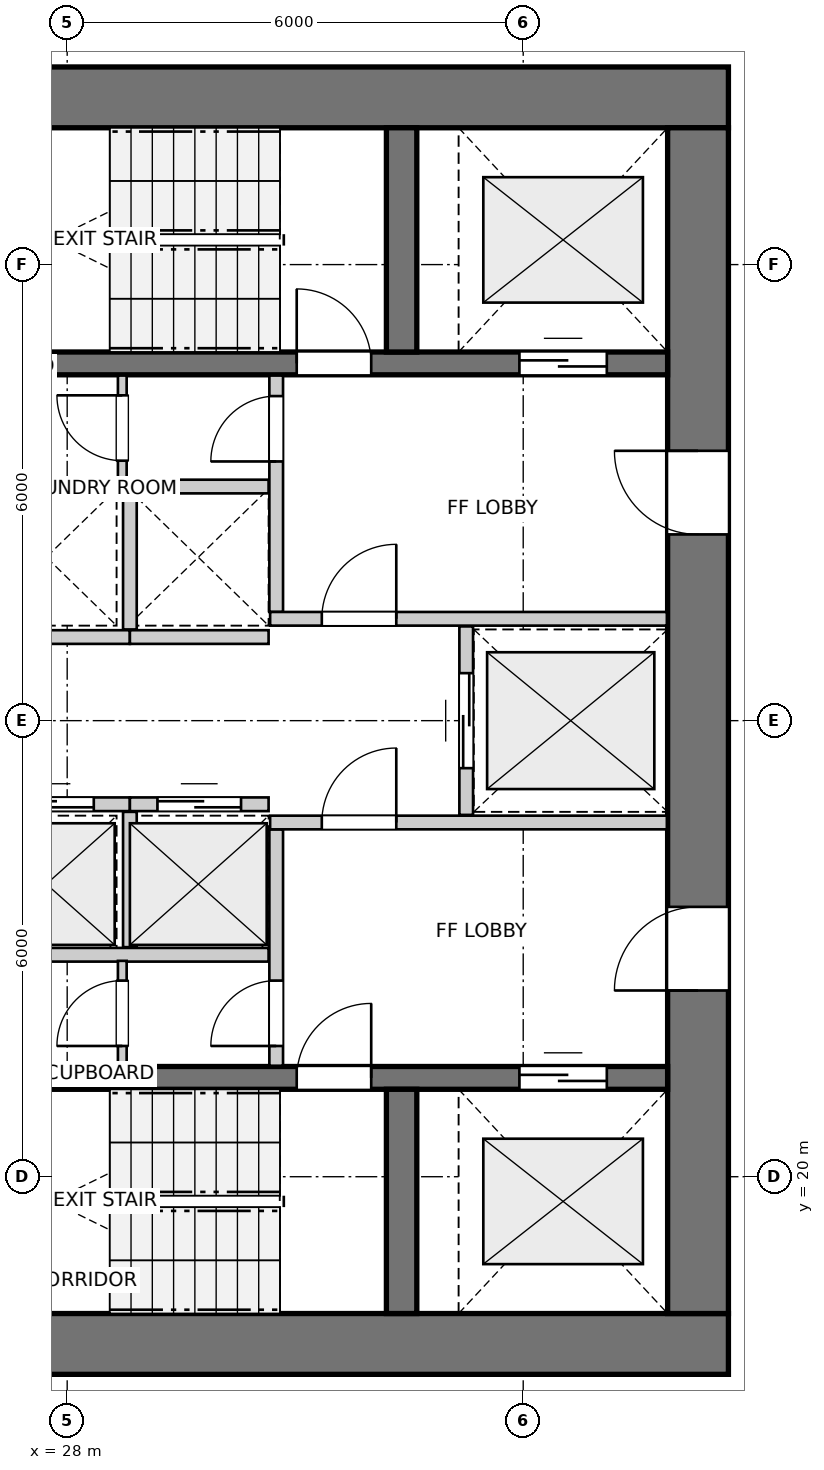
"""IFC4 building model, lengths in metres.
Left out: names, types, materials, properties, quantities, classifications, styles, units other than length and angle.
Written with IfcOpenShell. Run it as: python <this file> out.ifc"""

import sys

from ifc_helpers import new_model, si_unit, direction, frame, frame_2d, origin, place, context, subcontext, project, spatial, rectangle, extrude, source, transform, mapped, element, fill, save


model = new_model("IFC4")
c1 = context("Model", 3, precision=1e-05, world=origin(), true_north=direction((0.0, 1.0)))
c2 = subcontext(c1, "Body", "Model", "MODEL_VIEW")
j1 = project(units=[si_unit("LENGTHUNIT", "METRE"), si_unit("PLANEANGLEUNIT", "RADIAN")], contexts=[c1])
p1 = place(None, origin())
s1 = spatial("IfcSite", under=j1, at=p1, CompositionType="ELEMENT")
p2 = place(p1, origin())
s2 = spatial("IfcBuilding", under=s1, at=p2, CompositionType="ELEMENT")
p3 = place(p2, frame((0.0, 0.0, 55.8)))
s3 = spatial("IfcBuildingStorey", under=s2, at=p3, CompositionType="ELEMENT", Elevation=55.8)
for number, where, z_axis, x_axis in (
    (1, (24.0, 17.8, 0.0), (0.0, 0.0, 1.0), (1.0, 0.0, 0.0)),
    (2, (36.7, 34.2, 0.0), (0.0, 0.0, 1.0), (-1.0, 0.0, 0.0)),
):
    element("IfcWall", number, at=place(p3, frame(where, z_axis=z_axis, x_axis=x_axis)), inside=s3, PredefinedType="SHEAR", context=c2, shape_type="SweptSolid", body=[
        extrude(rectangle(XDim=12.7, YDim=0.8, at=frame_2d((6.35, 0.0))), origin(), (0.0, 0.0, 1.0), 2.94),
    ])
p4 = place(p3, frame((36.3, 18.2, 0.0), z_axis=(0.0, 0.0, 1.0), x_axis=(0.0, 1.0, 0.0)))
e3 = element("IfcWall", 3, at=p4, inside=s3, PredefinedType="SHEAR", context=c2, shape_type="SweptSolid", body=[
    extrude(rectangle(XDim=15.6, YDim=0.8, at=frame_2d((7.8, 0.0))), origin(), (0.0, 0.0, 1.0), 2.94),
])
p5 = place(p4, frame((4.25, 0.0, 0.0)))
e4 = element("IfcOpeningElement", 4, at=p5, cuts=e3, PredefinedType="OPENING", context=c2, shape_type="SweptSolid", body=[
    extrude(rectangle(XDim=1.1, YDim=2.15, at=frame_2d((0.55, 1.075))), frame((0.0, 0.41, 0.0), z_axis=(0.0, -1.0, 0.0), x_axis=(1.0, 0.0, 0.0)), (0.0, 0.0, 1.0), 0.82),
])
p6 = place(p4, frame((10.25, 0.0, 0.0)))
e5 = element("IfcOpeningElement", 5, at=p6, cuts=e3, PredefinedType="OPENING", context=c2, shape_type="SweptSolid", body=[
    extrude(rectangle(XDim=1.1, YDim=2.15, at=frame_2d((0.55, 1.075))), frame((0.0, 0.41, 0.0), z_axis=(0.0, -1.0, 0.0), x_axis=(1.0, 0.0, 0.0)), (0.0, 0.0, 1.0), 0.82),
])
p7 = place(p3, frame((24.8, 21.3, 0.0), z_axis=(0.0, 0.0, 1.0), x_axis=(1.0, 0.0, 0.0)))
e6 = element("IfcWall", 6, at=p7, inside=s3, PredefinedType="SHEAR", context=c2, shape_type="SweptSolid", body=[
    extrude(rectangle(XDim=11.1, YDim=0.3, at=frame_2d((5.55, 0.0))), origin(), (0.0, 0.0, 1.0), 2.94),
])
p8 = place(p7, frame((6.22, 0.0, 0.0)))
e7 = element("IfcOpeningElement", 7, at=p8, cuts=e6, PredefinedType="OPENING", context=c2, shape_type="SweptSolid", body=[
    extrude(rectangle(XDim=0.98, YDim=2.15, at=frame_2d((0.49, 1.075))), frame((0.0, 0.16, 0.0), z_axis=(0.0, -1.0, 0.0), x_axis=(1.0, 0.0, 0.0)), (0.0, 0.0, 1.0), 0.32),
])
p9 = place(p7, frame((9.15, 0.0, 0.0)))
e8 = element("IfcOpeningElement", 8, at=p9, cuts=e6, PredefinedType="OPENING", context=c2, shape_type="SweptSolid", body=[
    extrude(rectangle(XDim=1.15, YDim=2.15, at=frame_2d((0.575, 1.075))), frame((0.0, 0.16, 0.0), z_axis=(0.0, -1.0, 0.0), x_axis=(1.0, 0.0, 0.0)), (0.0, 0.0, 1.0), 0.32),
])
p10 = place(p3, frame((32.4, 18.2, 0.0), z_axis=(0.0, 0.0, 1.0), x_axis=(0.0, 1.0, 0.0)))
e9 = element("IfcWall", 9, at=p10, inside=s3, PredefinedType="SHEAR", context=c2, shape_type="SweptSolid", body=[
    extrude(rectangle(XDim=2.95, YDim=0.4, at=frame_2d((1.475, 0.0))), origin(), (0.0, 0.0, 1.0), 2.94),
])
p11 = place(p3, frame((24.8, 30.7, 0.0), z_axis=(0.0, 0.0, 1.0), x_axis=(1.0, 0.0, 0.0)))
e10 = element("IfcWall", 10, at=p11, inside=s3, PredefinedType="SHEAR", context=c2, shape_type="SweptSolid", body=[
    extrude(rectangle(XDim=11.1, YDim=0.3, at=frame_2d((5.55, 0.0))), origin(), (0.0, 0.0, 1.0), 2.94),
])
p12 = place(p11, frame((6.22, 0.0, 0.0)))
e11 = element("IfcOpeningElement", 11, at=p12, cuts=e10, PredefinedType="OPENING", context=c2, shape_type="SweptSolid", body=[
    extrude(rectangle(XDim=0.98, YDim=2.15, at=frame_2d((0.49, 1.075))), frame((0.0, 0.16, 0.0), z_axis=(0.0, -1.0, 0.0), x_axis=(1.0, 0.0, 0.0)), (0.0, 0.0, 1.0), 0.32),
])
p13 = place(p11, frame((9.15, 0.0, 0.0)))
e12 = element("IfcOpeningElement", 12, at=p13, cuts=e10, PredefinedType="OPENING", context=c2, shape_type="SweptSolid", body=[
    extrude(rectangle(XDim=1.15, YDim=2.15, at=frame_2d((0.575, 1.075))), frame((0.0, 0.16, 0.0), z_axis=(0.0, -1.0, 0.0), x_axis=(1.0, 0.0, 0.0)), (0.0, 0.0, 1.0), 0.32),
])
p14 = place(p3, frame((32.4, 30.85, 0.0), z_axis=(0.0, 0.0, 1.0), x_axis=(0.0, 1.0, 0.0)))
e13 = element("IfcWall", 13, at=p14, inside=s3, PredefinedType="SHEAR", context=c2, shape_type="SweptSolid", body=[
    extrude(rectangle(XDim=2.95, YDim=0.4, at=frame_2d((1.475, 0.0))), origin(), (0.0, 0.0, 1.0), 2.94),
])
p15 = place(p3, frame((30.75, 21.46, 0.0), z_axis=(0.0, 0.0, 1.0), x_axis=(0.0, 1.0, 0.0)))
e14 = element("IfcWall", 14, at=p15, inside=s3, PredefinedType="PARTITIONING", context=c2, shape_type="SweptSolid", body=[
    extrude(rectangle(XDim=3.11, YDim=0.18, at=frame_2d((1.555, 0.0))), origin(), (0.0, 0.0, 1.0), 2.94),
])
p16 = place(p15, frame((0.26, 0.0, 0.0)))
e15 = element("IfcOpeningElement", 15, at=p16, cuts=e14, PredefinedType="OPENING", context=c2, shape_type="SweptSolid", body=[
    extrude(rectangle(XDim=0.86, YDim=2.05, at=frame_2d((0.43, 1.025))), frame((0.0, 0.1, 0.0), z_axis=(0.0, -1.0, 0.0), x_axis=(1.0, 0.0, 0.0)), (0.0, 0.0, 1.0), 0.2),
])
p17 = place(p3, frame((30.67, 24.66, 0.0), z_axis=(0.0, 0.0, 1.0), x_axis=(1.0, 0.0, 0.0)))
e16 = element("IfcWall", 16, at=p17, inside=s3, PredefinedType="PARTITIONING", context=c2, shape_type="SweptSolid", body=[
    extrude(rectangle(XDim=5.22, YDim=0.18, at=frame_2d((2.61, 0.0))), origin(), (0.0, 0.0, 1.0), 2.94),
])
p18 = place(p17, frame((0.68, 0.0, 0.0)))
e17 = element("IfcOpeningElement", 17, at=p18, cuts=e16, PredefinedType="OPENING", context=c2, shape_type="SweptSolid", body=[
    extrude(rectangle(XDim=0.98, YDim=2.15, at=frame_2d((0.49, 1.075))), frame((0.0, 0.1, 0.0), z_axis=(0.0, -1.0, 0.0), x_axis=(1.0, 0.0, 0.0)), (0.0, 0.0, 1.0), 0.2),
])
p19 = place(p3, frame((30.75, 27.43, 0.0), z_axis=(0.0, 0.0, 1.0), x_axis=(0.0, 1.0, 0.0)))
e18 = element("IfcWall", 18, at=p19, inside=s3, PredefinedType="PARTITIONING", context=c2, shape_type="SweptSolid", body=[
    extrude(rectangle(XDim=3.11, YDim=0.18, at=frame_2d((1.555, 0.0))), origin(), (0.0, 0.0, 1.0), 2.94),
])
p20 = place(p19, frame((1.98, 0.0, 0.0)))
e19 = element("IfcOpeningElement", 19, at=p20, cuts=e18, PredefinedType="OPENING", context=c2, shape_type="SweptSolid", body=[
    extrude(rectangle(XDim=0.86, YDim=2.05, at=frame_2d((0.43, 1.025))), frame((0.0, 0.1, 0.0), z_axis=(0.0, -1.0, 0.0), x_axis=(1.0, 0.0, 0.0)), (0.0, 0.0, 1.0), 0.2),
])
p21 = place(p3, frame((30.67, 27.34, 0.0), z_axis=(0.0, 0.0, 1.0), x_axis=(1.0, 0.0, 0.0)))
e20 = element("IfcWall", 20, at=p21, inside=s3, PredefinedType="PARTITIONING", context=c2, shape_type="SweptSolid", body=[
    extrude(rectangle(XDim=5.22, YDim=0.18, at=frame_2d((2.61, 0.0))), origin(), (0.0, 0.0, 1.0), 2.94),
])
p22 = place(p21, frame((0.68, 0.0, 0.0)))
e21 = element("IfcOpeningElement", 21, at=p22, cuts=e20, PredefinedType="OPENING", context=c2, shape_type="SweptSolid", body=[
    extrude(rectangle(XDim=0.98, YDim=2.15, at=frame_2d((0.49, 1.075))), frame((0.0, 0.1, 0.0), z_axis=(0.0, -1.0, 0.0), x_axis=(1.0, 0.0, 0.0)), (0.0, 0.0, 1.0), 0.2),
])
p23 = place(p3, frame((33.25, 24.76, 0.0), z_axis=(0.0, 0.0, 1.0), x_axis=(0.0, 1.0, 0.0)))
e22 = element("IfcWall", 22, at=p23, inside=s3, PredefinedType="PARTITIONING", context=c2, shape_type="SweptSolid", body=[
    extrude(rectangle(XDim=2.48, YDim=0.18, at=frame_2d((1.24, 0.0))), origin(), (0.0, 0.0, 1.0), 2.94),
])
p24 = place(p23, frame((0.615, 0.0, 0.0)))
e23 = element("IfcOpeningElement", 23, at=p24, cuts=e22, PredefinedType="OPENING", context=c2, shape_type="SweptSolid", body=[
    extrude(rectangle(XDim=1.25, YDim=2.15, at=frame_2d((0.625, 1.075))), frame((0.0, 0.1, 0.0), z_axis=(0.0, -1.0, 0.0), x_axis=(1.0, 0.0, 0.0)), (0.0, 0.0, 1.0), 0.2),
])
p25 = place(p3, frame((24.81, 22.92, 0.0), z_axis=(0.0, 0.0, 1.0), x_axis=(1.0, 0.0, 0.0)))
e24 = element("IfcWall", 24, at=p25, inside=s3, PredefinedType="PARTITIONING", context=c2, shape_type="SweptSolid", body=[
    extrude(rectangle(XDim=5.84, YDim=0.18, at=frame_2d((2.92, 0.0))), origin(), (0.0, 0.0, 1.0), 2.94),
])
p26 = place(p3, frame((26.775, 24.9, 0.0), z_axis=(0.0, 0.0, 1.0), x_axis=(1.0, 0.0, 0.0)))
e25 = element("IfcWall", 25, at=p26, inside=s3, PredefinedType="PARTITIONING", context=c2, shape_type="SweptSolid", body=[
    extrude(rectangle(XDim=2.05, YDim=0.18, at=frame_2d((1.025, 0.0))), origin(), (0.0, 0.0, 1.0), 2.94),
])
p27 = place(p26, frame((0.475, 0.0, 0.0)))
e26 = element("IfcOpeningElement", 26, at=p27, cuts=e25, PredefinedType="OPENING", context=c2, shape_type="SweptSolid", body=[
    extrude(rectangle(XDim=1.1, YDim=2.15, at=frame_2d((0.55, 1.075))), frame((0.0, 0.1, 0.0), z_axis=(0.0, -1.0, 0.0), x_axis=(1.0, 0.0, 0.0)), (0.0, 0.0, 1.0), 0.2),
])
p28 = place(p3, frame((28.825, 24.9, 0.0), z_axis=(0.0, 0.0, 1.0), x_axis=(1.0, 0.0, 0.0)))
e27 = element("IfcWall", 27, at=p28, inside=s3, PredefinedType="PARTITIONING", context=c2, shape_type="SweptSolid", body=[
    extrude(rectangle(XDim=1.825, YDim=0.18, at=frame_2d((0.913, 0.0))), origin(), (0.0, 0.0, 1.0), 2.94),
])
p29 = place(p28, frame((0.363, 0.0, 0.0)))
e28 = element("IfcOpeningElement", 28, at=p29, cuts=e27, PredefinedType="OPENING", context=c2, shape_type="SweptSolid", body=[
    extrude(rectangle(XDim=1.1, YDim=2.15, at=frame_2d((0.55, 1.075))), frame((0.0, 0.1, 0.0), z_axis=(0.0, -1.0, 0.0), x_axis=(1.0, 0.0, 0.0)), (0.0, 0.0, 1.0), 0.2),
])
p30 = place(p3, frame((28.825, 23.02, 0.0), z_axis=(0.0, 0.0, 1.0), x_axis=(0.0, 1.0, 0.0)))
e29 = element("IfcWall", 29, at=p30, inside=s3, PredefinedType="PARTITIONING", context=c2, shape_type="SweptSolid", body=[
    extrude(rectangle(XDim=1.78, YDim=0.18, at=frame_2d((0.89, 0.0))), origin(), (0.0, 0.0, 1.0), 2.94),
])
p31 = place(p3, frame((24.81, 29.08, 0.0), z_axis=(0.0, 0.0, 1.0), x_axis=(1.0, 0.0, 0.0)))
e30 = element("IfcWall", 30, at=p31, inside=s3, PredefinedType="PARTITIONING", context=c2, shape_type="SweptSolid", body=[
    extrude(rectangle(XDim=5.84, YDim=0.18, at=frame_2d((2.92, 0.0))), origin(), (0.0, 0.0, 1.0), 2.94),
])
p32 = place(p3, frame((26.775, 27.1, 0.0), z_axis=(0.0, 0.0, 1.0), x_axis=(1.0, 0.0, 0.0)))
e31 = element("IfcWall", 31, at=p32, inside=s3, PredefinedType="PARTITIONING", context=c2, shape_type="SweptSolid", body=[
    extrude(rectangle(XDim=2.05, YDim=0.18, at=frame_2d((1.025, 0.0))), origin(), (0.0, 0.0, 1.0), 2.94),
])
p33 = place(p3, frame((28.825, 27.1, 0.0), z_axis=(0.0, 0.0, 1.0), x_axis=(1.0, 0.0, 0.0)))
e32 = element("IfcWall", 32, at=p33, inside=s3, PredefinedType="PARTITIONING", context=c2, shape_type="SweptSolid", body=[
    extrude(rectangle(XDim=1.825, YDim=0.18, at=frame_2d((0.913, 0.0))), origin(), (0.0, 0.0, 1.0), 2.94),
])
p34 = place(p3, frame((28.825, 27.2, 0.0), z_axis=(0.0, 0.0, 1.0), x_axis=(0.0, 1.0, 0.0)))
e33 = element("IfcWall", 33, at=p34, inside=s3, PredefinedType="PARTITIONING", context=c2, shape_type="SweptSolid", body=[
    extrude(rectangle(XDim=1.78, YDim=0.18, at=frame_2d((0.89, 0.0))), origin(), (0.0, 0.0, 1.0), 2.94),
])
p35 = place(p3, frame((28.725, 21.46, 0.0), z_axis=(0.0, 0.0, 1.0), x_axis=(0.0, 1.0, 0.0)))
e34 = element("IfcWall", 34, at=p35, inside=s3, PredefinedType="PARTITIONING", context=c2, shape_type="SweptSolid", body=[
    extrude(rectangle(XDim=1.38, YDim=0.115, at=frame_2d((0.69, 0.0))), origin(), (0.0, 0.0, 1.0), 2.94),
])
p36 = place(p35, frame((0.26, 0.0, 0.0)))
e35 = element("IfcOpeningElement", 35, at=p36, cuts=e34, PredefinedType="OPENING", context=c2, shape_type="SweptSolid", body=[
    extrude(rectangle(XDim=0.86, YDim=2.05, at=frame_2d((0.43, 1.025))), frame((0.0, 0.067, 0.0), z_axis=(0.0, -1.0, 0.0), x_axis=(1.0, 0.0, 0.0)), (0.0, 0.0, 1.0), 0.135),
])
p37 = place(p3, frame((28.725, 29.16, 0.0), z_axis=(0.0, 0.0, 1.0), x_axis=(0.0, 1.0, 0.0)))
e36 = element("IfcWall", 36, at=p37, inside=s3, PredefinedType="PARTITIONING", context=c2, shape_type="SweptSolid", body=[
    extrude(rectangle(XDim=1.38, YDim=0.115, at=frame_2d((0.69, 0.0))), origin(), (0.0, 0.0, 1.0), 2.94),
])
p38 = place(p37, frame((0.26, 0.0, 0.0)))
e37 = element("IfcOpeningElement", 37, at=p38, cuts=e36, PredefinedType="OPENING", context=c2, shape_type="SweptSolid", body=[
    extrude(rectangle(XDim=0.86, YDim=2.05, at=frame_2d((0.43, 1.025))), frame((0.0, 0.067, 0.0), z_axis=(0.0, -1.0, 0.0), x_axis=(1.0, 0.0, 0.0)), (0.0, 0.0, 1.0), 0.135),
])
m1 = source(origin(), c2, "Body", "SweptSolid", [
    extrude(rectangle(XDim=0.98, YDim=2.15, at=frame_2d((0.49, 1.075))), frame((0.0, 0.025, 0.0), z_axis=(0.0, -1.0, 0.0), x_axis=(1.0, 0.0, 0.0)), (0.0, 0.0, 1.0), 0.05),
])
p39 = place(p8, origin())
e38 = element("IfcDoor", 38, at=p39, inside=s3, OperationType="SINGLE_SWING_RIGHT", PredefinedType="DOOR", context=c2, shape_type="MappedRepresentation", body=[
    mapped(m1, transform((0.0, 0.0, 0.0), x_axis=(1.0, 0.0, 0.0), y_axis=(0.0, 1.0, 0.0), z_axis=(0.0, 0.0, 1.0), scale=1.0)),
])
fill(e7, e38)
m2 = source(origin(), c2, "Body", "SweptSolid", [
    extrude(rectangle(XDim=1.15, YDim=2.15, at=frame_2d((0.575, 1.075))), frame((0.0, 0.025, 0.0), z_axis=(0.0, -1.0, 0.0), x_axis=(1.0, 0.0, 0.0)), (0.0, 0.0, 1.0), 0.05),
])
p40 = place(p9, origin())
e39 = element("IfcDoor", 39, at=p40, inside=s3, OperationType="DOUBLE_DOOR_SLIDING", PredefinedType="DOOR", context=c2, shape_type="MappedRepresentation", body=[
    mapped(m2, transform((0.0, 0.0, 0.0), x_axis=(1.0, 0.0, 0.0), y_axis=(0.0, 1.0, 0.0), z_axis=(0.0, 0.0, 1.0), scale=1.0)),
])
fill(e8, e39)
p41 = place(p12, origin())
e40 = element("IfcDoor", 40, at=p41, inside=s3, OperationType="SINGLE_SWING_LEFT", PredefinedType="DOOR", context=c2, shape_type="MappedRepresentation", body=[
    mapped(m1, transform((0.0, 0.0, 0.0), x_axis=(1.0, 0.0, 0.0), y_axis=(0.0, 1.0, 0.0), z_axis=(0.0, 0.0, 1.0), scale=1.0)),
])
fill(e11, e40)
p42 = place(p13, origin())
e41 = element("IfcDoor", 41, at=p42, inside=s3, OperationType="DOUBLE_DOOR_SLIDING", PredefinedType="DOOR", context=c2, shape_type="MappedRepresentation", body=[
    mapped(m2, transform((0.0, 0.0, 0.0), x_axis=(1.0, 0.0, 0.0), y_axis=(0.0, 1.0, 0.0), z_axis=(0.0, 0.0, 1.0), scale=1.0)),
])
fill(e12, e41)
m3 = source(origin(), c2, "Body", "SweptSolid", [
    extrude(rectangle(XDim=1.1, YDim=2.15, at=frame_2d((0.55, 1.075))), frame((0.0, 0.025, 0.0), z_axis=(0.0, -1.0, 0.0), x_axis=(1.0, 0.0, 0.0)), (0.0, 0.0, 1.0), 0.05),
])
p43 = place(p5, origin())
e42 = element("IfcDoor", 42, at=p43, inside=s3, OperationType="SINGLE_SWING_LEFT", PredefinedType="DOOR", context=c2, shape_type="MappedRepresentation", body=[
    mapped(m3, transform((0.0, 0.0, 0.0), x_axis=(1.0, 0.0, 0.0), y_axis=(0.0, 1.0, 0.0), z_axis=(0.0, 0.0, 1.0), scale=1.0)),
])
fill(e4, e42)
p44 = place(p6, origin())
e43 = element("IfcDoor", 43, at=p44, inside=s3, OperationType="SINGLE_SWING_RIGHT", PredefinedType="DOOR", context=c2, shape_type="MappedRepresentation", body=[
    mapped(m3, transform((0.0, 0.0, 0.0), x_axis=(1.0, 0.0, 0.0), y_axis=(0.0, 1.0, 0.0), z_axis=(0.0, 0.0, 1.0), scale=1.0)),
])
fill(e5, e43)
m4 = source(origin(), c2, "Body", "SweptSolid", [
    extrude(rectangle(XDim=0.86, YDim=2.05, at=frame_2d((0.43, 1.025))), frame((0.0, 0.025, 0.0), z_axis=(0.0, -1.0, 0.0), x_axis=(1.0, 0.0, 0.0)), (0.0, 0.0, 1.0), 0.05),
])
p45 = place(p16, origin())
e44 = element("IfcDoor", 44, at=p45, inside=s3, OperationType="SINGLE_SWING_LEFT", PredefinedType="DOOR", context=c2, shape_type="MappedRepresentation", body=[
    mapped(m4, transform((0.0, 0.0, 0.0), x_axis=(1.0, 0.0, 0.0), y_axis=(0.0, 1.0, 0.0), z_axis=(0.0, 0.0, 1.0), scale=1.0)),
])
fill(e15, e44)
p46 = place(p18, origin())
e45 = element("IfcDoor", 45, at=p46, inside=s3, OperationType="SINGLE_SWING_RIGHT", PredefinedType="DOOR", context=c2, shape_type="MappedRepresentation", body=[
    mapped(m1, transform((0.0, 0.0, 0.0), x_axis=(1.0, 0.0, 0.0), y_axis=(0.0, 1.0, 0.0), z_axis=(0.0, 0.0, 1.0), scale=1.0)),
])
fill(e17, e45)
p47 = place(p20, origin())
e46 = element("IfcDoor", 46, at=p47, inside=s3, OperationType="SINGLE_SWING_LEFT", PredefinedType="DOOR", context=c2, shape_type="MappedRepresentation", body=[
    mapped(m4, transform((0.0, 0.0, 0.0), x_axis=(1.0, 0.0, 0.0), y_axis=(0.0, 1.0, 0.0), z_axis=(0.0, 0.0, 1.0), scale=1.0)),
])
fill(e19, e46)
p48 = place(p22, origin())
e47 = element("IfcDoor", 47, at=p48, inside=s3, OperationType="SINGLE_SWING_RIGHT", PredefinedType="DOOR", context=c2, shape_type="MappedRepresentation", body=[
    mapped(m1, transform((0.0, 0.0, 0.0), x_axis=(1.0, 0.0, 0.0), y_axis=(0.0, 1.0, 0.0), z_axis=(0.0, 0.0, 1.0), scale=1.0)),
])
fill(e21, e47)
m5 = source(origin(), c2, "Body", "SweptSolid", [
    extrude(rectangle(XDim=1.25, YDim=2.15, at=frame_2d((0.625, 1.075))), frame((0.0, 0.025, 0.0), z_axis=(0.0, -1.0, 0.0), x_axis=(1.0, 0.0, 0.0)), (0.0, 0.0, 1.0), 0.05),
])
p49 = place(p24, origin())
e48 = element("IfcDoor", 48, at=p49, inside=s3, OperationType="DOUBLE_DOOR_SLIDING", PredefinedType="DOOR", context=c2, shape_type="MappedRepresentation", body=[
    mapped(m5, transform((0.0, 0.0, 0.0), x_axis=(1.0, 0.0, 0.0), y_axis=(0.0, 1.0, 0.0), z_axis=(0.0, 0.0, 1.0), scale=1.0)),
])
fill(e23, e48)
p50 = place(p27, origin())
e49 = element("IfcDoor", 49, at=p50, inside=s3, OperationType="DOUBLE_DOOR_SLIDING", PredefinedType="DOOR", context=c2, shape_type="MappedRepresentation", body=[
    mapped(m3, transform((0.0, 0.0, 0.0), x_axis=(1.0, 0.0, 0.0), y_axis=(0.0, 1.0, 0.0), z_axis=(0.0, 0.0, 1.0), scale=1.0)),
])
fill(e26, e49)
p51 = place(p29, origin())
e50 = element("IfcDoor", 50, at=p51, inside=s3, OperationType="DOUBLE_DOOR_SLIDING", PredefinedType="DOOR", context=c2, shape_type="MappedRepresentation", body=[
    mapped(m3, transform((0.0, 0.0, 0.0), x_axis=(1.0, 0.0, 0.0), y_axis=(0.0, 1.0, 0.0), z_axis=(0.0, 0.0, 1.0), scale=1.0)),
])
fill(e28, e50)
p52 = place(p36, origin())
e51 = element("IfcDoor", 51, at=p52, inside=s3, OperationType="SINGLE_SWING_LEFT", PredefinedType="DOOR", context=c2, shape_type="MappedRepresentation", body=[
    mapped(m4, transform((0.0, 0.0, 0.0), x_axis=(1.0, 0.0, 0.0), y_axis=(0.0, 1.0, 0.0), z_axis=(0.0, 0.0, 1.0), scale=1.0)),
])
fill(e35, e51)
p53 = place(p38, origin())
e52 = element("IfcDoor", 52, at=p53, inside=s3, OperationType="SINGLE_SWING_RIGHT", PredefinedType="DOOR", context=c2, shape_type="MappedRepresentation", body=[
    mapped(m4, transform((0.0, 0.0, 0.0), x_axis=(1.0, 0.0, 0.0), y_axis=(0.0, 1.0, 0.0), z_axis=(0.0, 0.0, 1.0), scale=1.0)),
])
fill(e37, e52)
save(model, sys.argv[1])
